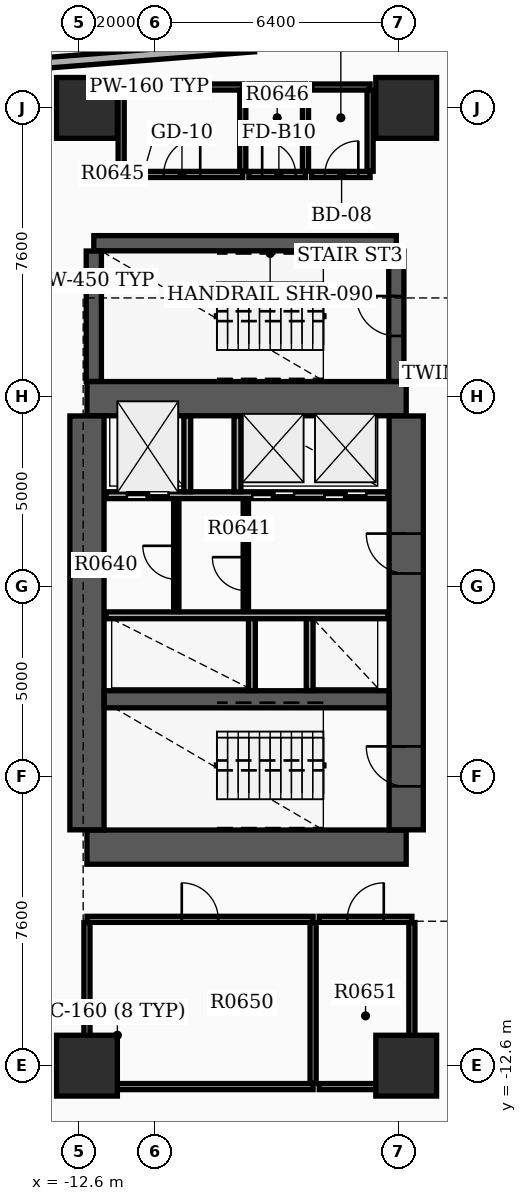
"""IFC4 building model, lengths in metres.
Left out: names, types, materials, properties, quantities, classifications, styles, units other than length and angle.
Written with IfcOpenShell. Run it as: python <this file> out.ifc"""

import sys

from ifc_helpers import new_model, si_unit, direction, frame, frame_2d, origin, origin_2d, place, context, subcontext, project, spatial, rectangle, extrude, element, fill, save


model = new_model("IFC4")
c1 = context("Model", 3, precision=1e-05, world=origin(), true_north=direction((0.0, 1.0)))
c2 = subcontext(c1, "Body", "Model", "MODEL_VIEW")
j1 = project(units=[si_unit("LENGTHUNIT", "METRE"), si_unit("PLANEANGLEUNIT", "RADIAN")], contexts=[c1])
p1 = place(None, origin())
s1 = spatial("IfcSite", under=j1, at=p1, CompositionType="ELEMENT")
p2 = place(p1, origin())
s2 = spatial("IfcBuilding", under=s1, at=p2, CompositionType="ELEMENT")
p3 = place(p2, frame((0.0, 0.0, 43.2)))
s3 = spatial("IfcBuildingStorey", under=s2, at=p3, CompositionType="ELEMENT", Elevation=43.2)
for number, where, z_axis, x_axis in (
    (1, (-12.4, -6.85, 0.0), (0.0, 0.0, 1.0), (1.0, 0.0, 0.0)),
    (2, (-12.4, 4.95, 0.0), (0.0, 0.0, 1.0), (1.0, 0.0, 0.0)),
):
    element("IfcWall", number, at=place(p3, frame(where, z_axis=z_axis, x_axis=x_axis)), inside=s3, PredefinedType="SHEAR", context=c2, shape_type="SweptSolid", body=[
        extrude(rectangle(XDim=8.4, YDim=0.9, at=frame_2d((4.2, 0.0))), origin(), (0.0, 0.0, 1.0), 3.65),
    ])
p4 = place(p3, frame((-12.4, -6.395, 0.0), z_axis=(0.0, 0.0, 1.0), x_axis=(0.0, 1.0, 0.0)))
e3 = element("IfcWall", 3, at=p4, inside=s3, PredefinedType="SHEAR", context=c2, shape_type="SweptSolid", body=[
    extrude(rectangle(XDim=10.89, YDim=0.9, at=frame_2d((5.445, 0.0))), origin(), (0.0, 0.0, 1.0), 3.65),
])
p5 = place(p3, frame((-4.0, -6.395, 0.0), z_axis=(0.0, 0.0, 1.0), x_axis=(0.0, 1.0, 0.0)))
e4 = element("IfcWall", 4, at=p5, inside=s3, PredefinedType="SHEAR", context=c2, shape_type="SweptSolid", body=[
    extrude(rectangle(XDim=10.89, YDim=0.9, at=frame_2d((5.445, 0.0))), origin(), (0.0, 0.0, 1.0), 3.65),
])
p6 = place(p5, frame((1.145, 0.0, 0.0)))
e5 = element("IfcOpeningElement", 5, at=p6, cuts=e4, PredefinedType="OPENING", context=c2, shape_type="SweptSolid", body=[
    extrude(rectangle(XDim=1.05, YDim=2.15, at=frame_2d((0.525, 1.075))), frame((0.0, 0.46, 0.0), z_axis=(0.0, -1.0, 0.0), x_axis=(1.0, 0.0, 0.0)), (0.0, 0.0, 1.0), 0.92),
])
p7 = place(p5, frame((6.745, 0.0, 0.0)))
e6 = element("IfcOpeningElement", 6, at=p7, cuts=e4, PredefinedType="OPENING", context=c2, shape_type="SweptSolid", body=[
    extrude(rectangle(XDim=1.05, YDim=2.15, at=frame_2d((0.525, 1.075))), frame((0.0, 0.46, 0.0), z_axis=(0.0, -1.0, 0.0), x_axis=(1.0, 0.0, 0.0)), (0.0, 0.0, 1.0), 0.92),
])
p8 = place(p3, frame((-11.945, -2.96, 0.0), z_axis=(0.0, 0.0, 1.0), x_axis=(1.0, 0.0, 0.0)))
e7 = element("IfcWall", 7, at=p8, inside=s3, PredefinedType="SHEAR", context=c2, shape_type="SweptSolid", body=[
    extrude(rectangle(XDim=7.49, YDim=0.45, at=frame_2d((3.745, 0.0))), origin(), (0.0, 0.0, 1.0), 3.65),
])
p9 = place(p3, frame((-12.22, 9.04, 0.0), z_axis=(0.0, 0.0, 1.0), x_axis=(1.0, 0.0, 0.0)))
e8 = element("IfcWall", 8, at=p9, inside=s3, PredefinedType="SHEAR", context=c2, shape_type="SweptSolid", body=[
    extrude(rectangle(XDim=7.96, YDim=0.4, at=frame_2d((3.98, 0.0))), origin(), (0.0, 0.0, 1.0), 3.65),
])
p10 = place(p3, frame((-12.22, 5.405, 0.0), z_axis=(0.0, 0.0, 1.0), x_axis=(0.0, 1.0, 0.0)))
e9 = element("IfcWall", 9, at=p10, inside=s3, PredefinedType="SHEAR", context=c2, shape_type="SweptSolid", body=[
    extrude(rectangle(XDim=3.43, YDim=0.4, at=frame_2d((1.715, 0.0))), origin(), (0.0, 0.0, 1.0), 3.65),
])
p11 = place(p3, frame((-4.26, 5.405, 0.0), z_axis=(0.0, 0.0, 1.0), x_axis=(0.0, 1.0, 0.0)))
e10 = element("IfcWall", 10, at=p11, inside=s3, PredefinedType="SHEAR", context=c2, shape_type="SweptSolid", body=[
    extrude(rectangle(XDim=3.43, YDim=0.4, at=frame_2d((1.715, 0.0))), origin(), (0.0, 0.0, 1.0), 3.65),
])
p12 = place(p11, frame((1.195, 0.0, 0.0)))
e11 = element("IfcOpeningElement", 11, at=p12, cuts=e10, PredefinedType="OPENING", context=c2, shape_type="SweptSolid", body=[
    extrude(rectangle(XDim=1.05, YDim=2.15, at=frame_2d((0.525, 1.075))), frame((0.0, 0.21, 0.0), z_axis=(0.0, -1.0, 0.0), x_axis=(1.0, 0.0, 0.0)), (0.0, 0.0, 1.0), 0.42),
])
for number, where, z_axis, x_axis in (
    (12, (-12.4, -12.6, 0.0), (0.0, 0.0, 1.0), (1.0, 0.0, 0.0)),
    (13, (-12.4, 12.6, 0.0), (0.0, 0.0, 1.0), (1.0, 0.0, 0.0)),
    (14, (-4.0, -12.6, 0.0), (0.0, 0.0, 1.0), (1.0, 0.0, 0.0)),
    (15, (-4.0, 12.6, 0.0), (0.0, 0.0, 1.0), (1.0, 0.0, 0.0)),
):
    element("IfcColumn", number, at=place(p3, frame(where, z_axis=z_axis, x_axis=x_axis)), inside=s3, PredefinedType="COLUMN", context=c2, shape_type="SweptSolid", body=[
        extrude(rectangle(XDim=1.6, YDim=1.6, at=origin_2d()), origin(), (0.0, 0.0, 1.0), 3.9),
    ])
p13 = place(p3, frame((-14.281, 13.722, 0.0), z_axis=(0.0, 0.0, 1.0), x_axis=(0.99691915642, 0.078435932851, 0.0)))
e16 = element("IfcWall", 16, at=p13, inside=s3, PredefinedType="STANDARD", context=c2, shape_type="SweptSolid", body=[
    extrude(rectangle(XDim=6.3, YDim=0.28, at=frame_2d((3.15, 0.0))), origin(), (0.0, 0.0, 1.0), 2.86),
])
p14 = place(p3, frame((-11.9, 2.41, 0.0), z_axis=(0.0, 0.0, 1.0), x_axis=(1.0, 0.0, 0.0)))
e17 = element("IfcWall", 17, at=p14, inside=s3, PredefinedType="SOLIDWALL", context=c2, shape_type="SweptSolid", body=[
    extrude(rectangle(XDim=7.42, YDim=0.18, at=frame_2d((3.71, 0.0))), origin(), (0.0, 0.0, 1.0), 2.85),
])
p15 = place(p14, frame((0.55, 0.0, 0.0)))
e18 = element("IfcOpeningElement", 18, at=p15, cuts=e17, PredefinedType="OPENING", context=c2, shape_type="SweptSolid", body=[
    extrude(rectangle(XDim=1.1, YDim=2.15, at=frame_2d((0.55, 1.075))), frame((0.0, 0.1, 0.0), z_axis=(0.0, -1.0, 0.0), x_axis=(1.0, 0.0, 0.0)), (0.0, 0.0, 1.0), 0.2),
])
p16 = place(p14, frame((3.85, 0.0, 0.0)))
e19 = element("IfcOpeningElement", 19, at=p16, cuts=e17, PredefinedType="OPENING", context=c2, shape_type="SweptSolid", body=[
    extrude(rectangle(XDim=1.1, YDim=2.15, at=frame_2d((0.55, 1.075))), frame((0.0, 0.1, 0.0), z_axis=(0.0, -1.0, 0.0), x_axis=(1.0, 0.0, 0.0)), (0.0, 0.0, 1.0), 0.2),
])
p17 = place(p14, frame((5.75, 0.0, 0.0)))
e20 = element("IfcOpeningElement", 20, at=p17, cuts=e17, PredefinedType="OPENING", context=c2, shape_type="SweptSolid", body=[
    extrude(rectangle(XDim=1.1, YDim=2.15, at=frame_2d((0.55, 1.075))), frame((0.0, 0.1, 0.0), z_axis=(0.0, -1.0, 0.0), x_axis=(1.0, 0.0, 0.0)), (0.0, 0.0, 1.0), 0.2),
])
p18 = place(p3, frame((-11.9, -0.75, 0.0), z_axis=(0.0, 0.0, 1.0), x_axis=(1.0, 0.0, 0.0)))
e21 = element("IfcWall", 21, at=p18, inside=s3, PredefinedType="SOLIDWALL", context=c2, shape_type="SweptSolid", body=[
    extrude(rectangle(XDim=7.42, YDim=0.18, at=frame_2d((3.71, 0.0))), origin(), (0.0, 0.0, 1.0), 2.85),
])
for number, where, z_axis, x_axis in (
    (22, (-9.76, 2.5, 0.0), (0.0, 0.0, 1.0), (0.0, 1.0, 0.0)),
    (23, (-8.44, 2.5, 0.0), (0.0, 0.0, 1.0), (0.0, 1.0, 0.0)),
):
    element("IfcWall", number, at=place(p3, frame(where, z_axis=z_axis, x_axis=x_axis)), inside=s3, PredefinedType="SOLIDWALL", context=c2, shape_type="SweptSolid", body=[
        extrude(rectangle(XDim=1.99, YDim=0.18, at=frame_2d((0.995, 0.0))), origin(), (0.0, 0.0, 1.0), 2.85),
    ])
for number, where, z_axis, x_axis in (
    (24, (-8.06, -2.73, 0.0), (0.0, 0.0, 1.0), (0.0, 1.0, 0.0)),
    (25, (-6.54, -2.73, 0.0), (0.0, 0.0, 1.0), (0.0, 1.0, 0.0)),
):
    element("IfcWall", number, at=place(p3, frame(where, z_axis=z_axis, x_axis=x_axis)), inside=s3, PredefinedType="SOLIDWALL", context=c2, shape_type="SweptSolid", body=[
        extrude(rectangle(XDim=1.89, YDim=0.18, at=frame_2d((0.945, 0.0))), origin(), (0.0, 0.0, 1.0), 2.85),
    ])
p19 = place(p3, frame((-8.22, -0.65, 0.0), z_axis=(0.0, 0.0, 1.0), x_axis=(0.0, 1.0, 0.0)))
e26 = element("IfcWall", 26, at=p19, inside=s3, PredefinedType="SOLIDWALL", context=c2, shape_type="SweptSolid", body=[
    extrude(rectangle(XDim=2.96, YDim=0.14, at=frame_2d((1.48, 0.0))), origin(), (0.0, 0.0, 1.0), 2.85),
])
p20 = place(p19, frame((0.55, 0.0, 0.0)))
e27 = element("IfcOpeningElement", 27, at=p20, cuts=e26, PredefinedType="OPENING", context=c2, shape_type="SweptSolid", body=[
    extrude(rectangle(XDim=0.88, YDim=2.1, at=frame_2d((0.44, 1.05))), frame((0.0, 0.08, 0.0), z_axis=(0.0, -1.0, 0.0), x_axis=(1.0, 0.0, 0.0)), (0.0, 0.0, 1.0), 0.16),
])
p21 = place(p3, frame((-10.05, -0.652, 0.0), z_axis=(0.0, 0.0, 1.0), x_axis=(0.0, 1.0, 0.0)))
e28 = element("IfcWall", 28, at=p21, inside=s3, PredefinedType="PARTITIONING", context=c2, shape_type="SweptSolid", body=[
    extrude(rectangle(XDim=2.962, YDim=0.14, at=frame_2d((1.481, 0.0))), origin(), (0.0, 0.0, 1.0), 2.85),
])
p22 = place(p21, frame((0.85, 0.0, 0.0)))
e29 = element("IfcOpeningElement", 29, at=p22, cuts=e28, PredefinedType="OPENING", context=c2, shape_type="SweptSolid", body=[
    extrude(rectangle(XDim=0.88, YDim=2.1, at=frame_2d((0.44, 1.05))), frame((0.0, 0.08, 0.0), z_axis=(0.0, -1.0, 0.0), x_axis=(1.0, 0.0, 0.0)), (0.0, 0.0, 1.0), 0.16),
])
p23 = place(p3, frame((-11.5, 10.85, 0.0), z_axis=(0.0, 0.0, 1.0), x_axis=(1.0, 0.0, 0.0)))
e30 = element("IfcWall", 30, at=p23, inside=s3, PredefinedType="PARTITIONING", context=c2, shape_type="SweptSolid", body=[
    extrude(rectangle(XDim=3.2, YDim=0.16, at=frame_2d((1.6, 0.0))), origin(), (0.0, 0.0, 1.0), 2.85),
])
p24 = place(p23, frame((1.12, 0.0, 0.0)))
e31 = element("IfcOpeningElement", 31, at=p24, cuts=e30, PredefinedType="OPENING", context=c2, shape_type="SweptSolid", body=[
    extrude(rectangle(XDim=0.96, YDim=2.15, at=frame_2d((0.48, 1.075))), frame((0.0, 0.09, 0.0), z_axis=(0.0, -1.0, 0.0), x_axis=(1.0, 0.0, 0.0)), (0.0, 0.0, 1.0), 0.18),
])
p25 = place(p3, frame((-11.5, 13.15, 0.0), z_axis=(0.0, 0.0, 1.0), x_axis=(1.0, 0.0, 0.0)))
e32 = element("IfcWall", 32, at=p25, inside=s3, PredefinedType="PARTITIONING", context=c2, shape_type="SweptSolid", body=[
    extrude(rectangle(XDim=3.2, YDim=0.16, at=frame_2d((1.6, 0.0))), origin(), (0.0, 0.0, 1.0), 2.85),
])
for number, where, z_axis, x_axis in (
    (33, (-11.5, 10.935, 0.0), (0.0, 0.0, 1.0), (0.0, 1.0, 0.0)),
    (34, (-8.3, 10.935, 0.0), (0.0, 0.0, 1.0), (0.0, 1.0, 0.0)),
):
    element("IfcWall", number, at=place(p3, frame(where, z_axis=z_axis, x_axis=x_axis)), inside=s3, PredefinedType="PARTITIONING", context=c2, shape_type="SweptSolid", body=[
        extrude(rectangle(XDim=2.13, YDim=0.16, at=frame_2d((1.065, 0.0))), origin(), (0.0, 0.0, 1.0), 2.85),
    ])
p26 = place(p3, frame((-8.14, 10.85, 0.0), z_axis=(0.0, 0.0, 1.0), x_axis=(1.0, 0.0, 0.0)))
e35 = element("IfcWall", 35, at=p26, inside=s3, PredefinedType="PARTITIONING", context=c2, shape_type="SweptSolid", body=[
    extrude(rectangle(XDim=1.49, YDim=0.16, at=frame_2d((0.745, 0.0))), origin(), (0.0, 0.0, 1.0), 2.85),
])
p27 = place(p26, frame((0.35, 0.0, 0.0)))
e36 = element("IfcOpeningElement", 36, at=p27, cuts=e35, PredefinedType="OPENING", context=c2, shape_type="SweptSolid", body=[
    extrude(rectangle(XDim=0.88, YDim=2.1, at=frame_2d((0.44, 1.05))), frame((0.0, 0.09, 0.0), z_axis=(0.0, -1.0, 0.0), x_axis=(1.0, 0.0, 0.0)), (0.0, 0.0, 1.0), 0.18),
])
p28 = place(p3, frame((-8.14, 13.15, 0.0), z_axis=(0.0, 0.0, 1.0), x_axis=(1.0, 0.0, 0.0)))
e37 = element("IfcWall", 37, at=p28, inside=s3, PredefinedType="PARTITIONING", context=c2, shape_type="SweptSolid", body=[
    extrude(rectangle(XDim=1.49, YDim=0.16, at=frame_2d((0.745, 0.0))), origin(), (0.0, 0.0, 1.0), 2.85),
])
p29 = place(p3, frame((-6.65, 10.935, 0.0), z_axis=(0.0, 0.0, 1.0), x_axis=(0.0, 1.0, 0.0)))
e38 = element("IfcWall", 38, at=p29, inside=s3, PredefinedType="PARTITIONING", context=c2, shape_type="SweptSolid", body=[
    extrude(rectangle(XDim=2.13, YDim=0.16, at=frame_2d((1.065, 0.0))), origin(), (0.0, 0.0, 1.0), 2.85),
])
p30 = place(p3, frame((-6.49, 10.85, 0.0), z_axis=(0.0, 0.0, 1.0), x_axis=(1.0, 0.0, 0.0)))
e39 = element("IfcWall", 39, at=p30, inside=s3, PredefinedType="PARTITIONING", context=c2, shape_type="SweptSolid", body=[
    extrude(rectangle(XDim=1.54, YDim=0.16, at=frame_2d((0.77, 0.0))), origin(), (0.0, 0.0, 1.0), 2.85),
])
p31 = place(p30, frame((0.35, 0.0, 0.0)))
e40 = element("IfcOpeningElement", 40, at=p31, cuts=e39, PredefinedType="OPENING", context=c2, shape_type="SweptSolid", body=[
    extrude(rectangle(XDim=0.88, YDim=2.15, at=frame_2d((0.44, 1.075))), frame((0.0, 0.09, 0.0), z_axis=(0.0, -1.0, 0.0), x_axis=(1.0, 0.0, 0.0)), (0.0, 0.0, 1.0), 0.18),
])
p32 = place(p3, frame((-6.49, 13.15, 0.0), z_axis=(0.0, 0.0, 1.0), x_axis=(1.0, 0.0, 0.0)))
e41 = element("IfcWall", 41, at=p32, inside=s3, PredefinedType="PARTITIONING", context=c2, shape_type="SweptSolid", body=[
    extrude(rectangle(XDim=1.54, YDim=0.16, at=frame_2d((0.77, 0.0))), origin(), (0.0, 0.0, 1.0), 2.85),
])
p33 = place(p3, frame((-4.95, 10.935, 0.0), z_axis=(0.0, 0.0, 1.0), x_axis=(0.0, 1.0, 0.0)))
e42 = element("IfcWall", 42, at=p33, inside=s3, PredefinedType="PARTITIONING", context=c2, shape_type="SweptSolid", body=[
    extrude(rectangle(XDim=2.13, YDim=0.16, at=frame_2d((1.065, 0.0))), origin(), (0.0, 0.0, 1.0), 2.85),
])
p34 = place(p3, frame((-12.4, -13.15, 0.0), z_axis=(0.0, 0.0, 1.0), x_axis=(1.0, 0.0, 0.0)))
e43 = element("IfcWall", 43, at=p34, inside=s3, PredefinedType="PARTITIONING", context=c2, shape_type="SweptSolid", body=[
    extrude(rectangle(XDim=5.95, YDim=0.16, at=frame_2d((2.975, 0.0))), origin(), (0.0, 0.0, 1.0), 2.85),
])
p35 = place(p3, frame((-12.4, -8.75, 0.0), z_axis=(0.0, 0.0, 1.0), x_axis=(1.0, 0.0, 0.0)))
e44 = element("IfcWall", 44, at=p35, inside=s3, PredefinedType="PARTITIONING", context=c2, shape_type="SweptSolid", body=[
    extrude(rectangle(XDim=5.95, YDim=0.16, at=frame_2d((2.975, 0.0))), origin(), (0.0, 0.0, 1.0), 2.85),
])
p36 = place(p35, frame((2.495, 0.0, 0.0)))
e45 = element("IfcOpeningElement", 45, at=p36, cuts=e44, PredefinedType="OPENING", context=c2, shape_type="SweptSolid", body=[
    extrude(rectangle(XDim=0.96, YDim=2.15, at=frame_2d((0.48, 1.075))), frame((0.0, 0.09, 0.0), z_axis=(0.0, -1.0, 0.0), x_axis=(1.0, 0.0, 0.0)), (0.0, 0.0, 1.0), 0.18),
])
for number, where, z_axis, x_axis in (
    (46, (-12.4, -13.065, 0.0), (0.0, 0.0, 1.0), (0.0, 1.0, 0.0)),
    (47, (-6.45, -13.065, 0.0), (0.0, 0.0, 1.0), (0.0, 1.0, 0.0)),
):
    element("IfcWall", number, at=place(p3, frame(where, z_axis=z_axis, x_axis=x_axis)), inside=s3, PredefinedType="PARTITIONING", context=c2, shape_type="SweptSolid", body=[
        extrude(rectangle(XDim=4.23, YDim=0.16, at=frame_2d((2.115, 0.0))), origin(), (0.0, 0.0, 1.0), 2.85),
    ])
p37 = place(p3, frame((-6.29, -13.15, 0.0), z_axis=(0.0, 0.0, 1.0), x_axis=(1.0, 0.0, 0.0)))
e48 = element("IfcWall", 48, at=p37, inside=s3, PredefinedType="PARTITIONING", context=c2, shape_type="SweptSolid", body=[
    extrude(rectangle(XDim=2.44, YDim=0.16, at=frame_2d((1.22, 0.0))), origin(), (0.0, 0.0, 1.0), 2.85),
])
p38 = place(p3, frame((-6.29, -8.75, 0.0), z_axis=(0.0, 0.0, 1.0), x_axis=(1.0, 0.0, 0.0)))
e49 = element("IfcWall", 49, at=p38, inside=s3, PredefinedType="PARTITIONING", context=c2, shape_type="SweptSolid", body=[
    extrude(rectangle(XDim=2.44, YDim=0.16, at=frame_2d((1.22, 0.0))), origin(), (0.0, 0.0, 1.0), 2.85),
])
p39 = place(p38, frame((0.74, 0.0, 0.0)))
e50 = element("IfcOpeningElement", 50, at=p39, cuts=e49, PredefinedType="OPENING", context=c2, shape_type="SweptSolid", body=[
    extrude(rectangle(XDim=0.96, YDim=2.15, at=frame_2d((0.48, 1.075))), frame((0.0, 0.09, 0.0), z_axis=(0.0, -1.0, 0.0), x_axis=(1.0, 0.0, 0.0)), (0.0, 0.0, 1.0), 0.18),
])
p40 = place(p3, frame((-3.85, -13.065, 0.0), z_axis=(0.0, 0.0, 1.0), x_axis=(0.0, 1.0, 0.0)))
e51 = element("IfcWall", 51, at=p40, inside=s3, PredefinedType="PARTITIONING", context=c2, shape_type="SweptSolid", body=[
    extrude(rectangle(XDim=4.23, YDim=0.16, at=frame_2d((2.115, 0.0))), origin(), (0.0, 0.0, 1.0), 2.85),
])
p41 = place(p6, origin())
e52 = element("IfcDoor", 52, at=p41, inside=s3, OperationType="SINGLE_SWING_RIGHT", PredefinedType="DOOR", context=c2, shape_type="SweptSolid", body=[
    extrude(rectangle(XDim=1.05, YDim=2.15, at=frame_2d((0.525, 1.075))), frame((0.0, 0.025, 0.0), z_axis=(0.0, -1.0, 0.0), x_axis=(1.0, 0.0, 0.0)), (0.0, 0.0, 1.0), 0.05),
])
fill(e5, e52)
p42 = place(p7, origin())
e53 = element("IfcDoor", 53, at=p42, inside=s3, OperationType="SINGLE_SWING_RIGHT", PredefinedType="DOOR", context=c2, shape_type="SweptSolid", body=[
    extrude(rectangle(XDim=1.05, YDim=2.15, at=frame_2d((0.525, 1.075))), frame((0.0, 0.025, 0.0), z_axis=(0.0, -1.0, 0.0), x_axis=(1.0, 0.0, 0.0)), (0.0, 0.0, 1.0), 0.05),
])
fill(e6, e53)
p43 = place(p12, origin())
e54 = element("IfcDoor", 54, at=p43, inside=s3, OperationType="SINGLE_SWING_RIGHT", PredefinedType="DOOR", context=c2, shape_type="SweptSolid", body=[
    extrude(rectangle(XDim=1.05, YDim=2.15, at=frame_2d((0.525, 1.075))), frame((0.0, 0.025, 0.0), z_axis=(0.0, -1.0, 0.0), x_axis=(1.0, 0.0, 0.0)), (0.0, 0.0, 1.0), 0.05),
])
fill(e11, e54)
p44 = place(p15, origin())
e55 = element("IfcDoor", 55, at=p44, inside=s3, OperationType="DOUBLE_DOOR_SLIDING", PredefinedType="DOOR", context=c2, shape_type="SweptSolid", body=[
    extrude(rectangle(XDim=1.1, YDim=2.15, at=frame_2d((0.55, 1.075))), frame((0.0, 0.025, 0.0), z_axis=(0.0, -1.0, 0.0), x_axis=(1.0, 0.0, 0.0)), (0.0, 0.0, 1.0), 0.05),
])
fill(e18, e55)
p45 = place(p16, origin())
e56 = element("IfcDoor", 56, at=p45, inside=s3, OperationType="DOUBLE_DOOR_SLIDING", PredefinedType="DOOR", context=c2, shape_type="SweptSolid", body=[
    extrude(rectangle(XDim=1.1, YDim=2.15, at=frame_2d((0.55, 1.075))), frame((0.0, 0.025, 0.0), z_axis=(0.0, -1.0, 0.0), x_axis=(1.0, 0.0, 0.0)), (0.0, 0.0, 1.0), 0.05),
])
fill(e19, e56)
p46 = place(p17, origin())
e57 = element("IfcDoor", 57, at=p46, inside=s3, OperationType="DOUBLE_DOOR_SLIDING", PredefinedType="DOOR", context=c2, shape_type="SweptSolid", body=[
    extrude(rectangle(XDim=1.1, YDim=2.15, at=frame_2d((0.55, 1.075))), frame((0.0, 0.025, 0.0), z_axis=(0.0, -1.0, 0.0), x_axis=(1.0, 0.0, 0.0)), (0.0, 0.0, 1.0), 0.05),
])
fill(e20, e57)
p47 = place(p20, origin())
e58 = element("IfcDoor", 58, at=p47, inside=s3, OperationType="SINGLE_SWING_RIGHT", PredefinedType="DOOR", context=c2, shape_type="SweptSolid", body=[
    extrude(rectangle(XDim=0.88, YDim=2.1, at=frame_2d((0.44, 1.05))), frame((0.0, 0.025, 0.0), z_axis=(0.0, -1.0, 0.0), x_axis=(1.0, 0.0, 0.0)), (0.0, 0.0, 1.0), 0.05),
])
fill(e27, e58)
p48 = place(p22, origin())
e59 = element("IfcDoor", 59, at=p48, inside=s3, OperationType="SINGLE_SWING_RIGHT", PredefinedType="DOOR", context=c2, shape_type="SweptSolid", body=[
    extrude(rectangle(XDim=0.88, YDim=2.1, at=frame_2d((0.44, 1.05))), frame((0.0, 0.025, 0.0), z_axis=(0.0, -1.0, 0.0), x_axis=(1.0, 0.0, 0.0)), (0.0, 0.0, 1.0), 0.05),
])
fill(e29, e59)
p49 = place(p24, origin())
e60 = element("IfcDoor", 60, at=p49, inside=s3, OperationType="SINGLE_SWING_RIGHT", PredefinedType="DOOR", context=c2, shape_type="SweptSolid", body=[
    extrude(rectangle(XDim=0.96, YDim=2.15, at=frame_2d((0.48, 1.075))), frame((0.0, 0.025, 0.0), z_axis=(0.0, -1.0, 0.0), x_axis=(1.0, 0.0, 0.0)), (0.0, 0.0, 1.0), 0.05),
])
fill(e31, e60)
p50 = place(p27, origin())
e61 = element("IfcDoor", 61, at=p50, inside=s3, OperationType="SINGLE_SWING_LEFT", PredefinedType="DOOR", context=c2, shape_type="SweptSolid", body=[
    extrude(rectangle(XDim=0.88, YDim=2.1, at=frame_2d((0.44, 1.05))), frame((0.0, 0.025, 0.0), z_axis=(0.0, -1.0, 0.0), x_axis=(1.0, 0.0, 0.0)), (0.0, 0.0, 1.0), 0.05),
])
fill(e36, e61)
p51 = place(p31, origin())
e62 = element("IfcDoor", 62, at=p51, inside=s3, OperationType="SINGLE_SWING_RIGHT", PredefinedType="DOOR", context=c2, shape_type="SweptSolid", body=[
    extrude(rectangle(XDim=0.88, YDim=2.15, at=frame_2d((0.44, 1.075))), frame((0.0, 0.025, 0.0), z_axis=(0.0, -1.0, 0.0), x_axis=(1.0, 0.0, 0.0)), (0.0, 0.0, 1.0), 0.05),
])
fill(e40, e62)
p52 = place(p36, origin())
e63 = element("IfcDoor", 63, at=p52, inside=s3, OperationType="SINGLE_SWING_LEFT", PredefinedType="DOOR", context=c2, shape_type="SweptSolid", body=[
    extrude(rectangle(XDim=0.96, YDim=2.15, at=frame_2d((0.48, 1.075))), frame((0.0, 0.025, 0.0), z_axis=(0.0, -1.0, 0.0), x_axis=(1.0, 0.0, 0.0)), (0.0, 0.0, 1.0), 0.05),
])
fill(e45, e63)
p53 = place(p39, origin())
e64 = element("IfcDoor", 64, at=p53, inside=s3, OperationType="SINGLE_SWING_RIGHT", PredefinedType="DOOR", context=c2, shape_type="SweptSolid", body=[
    extrude(rectangle(XDim=0.96, YDim=2.15, at=frame_2d((0.48, 1.075))), frame((0.0, 0.025, 0.0), z_axis=(0.0, -1.0, 0.0), x_axis=(1.0, 0.0, 0.0)), (0.0, 0.0, 1.0), 0.05),
])
fill(e50, e64)
save(model, sys.argv[1])
